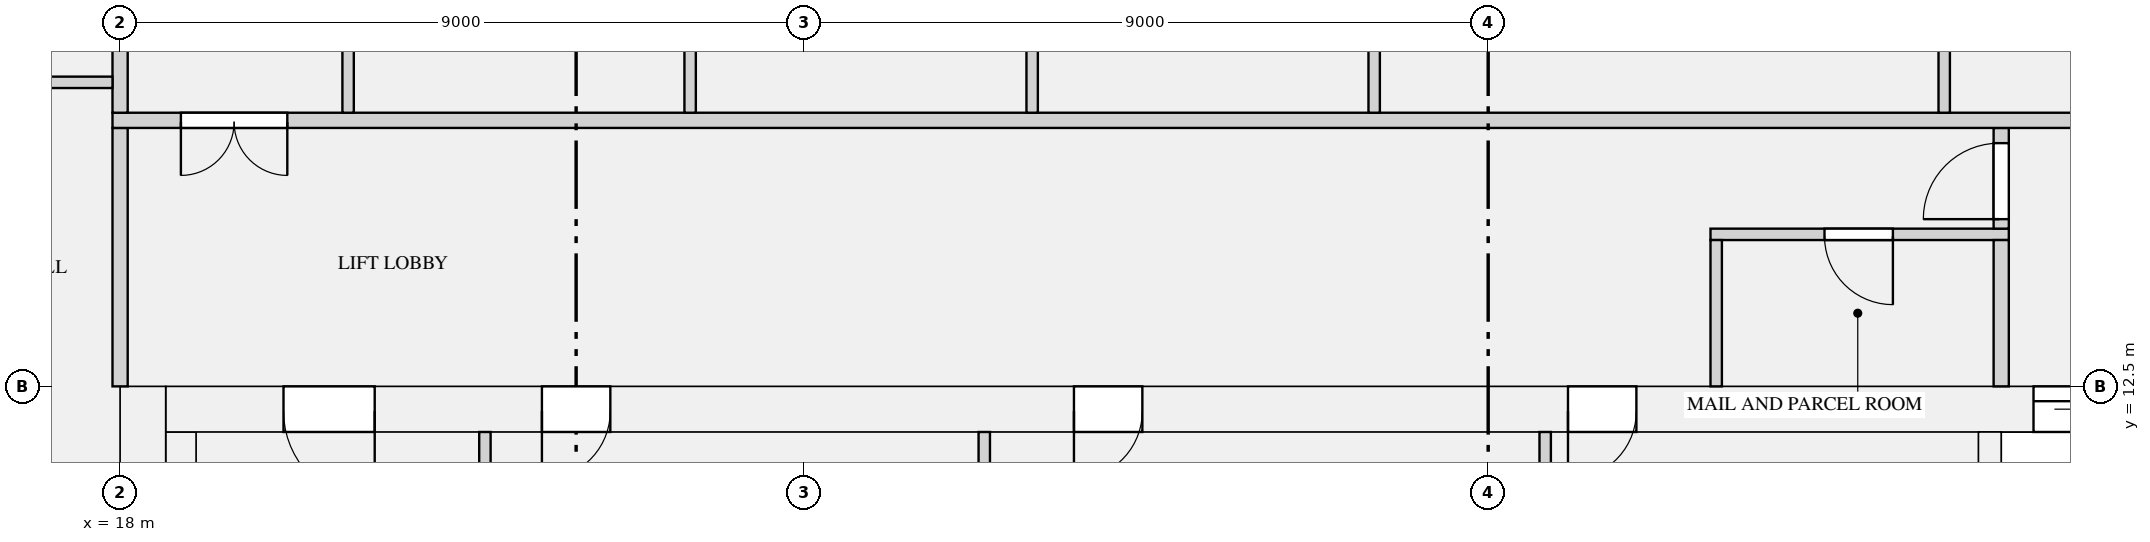
"""IFC4 building model, lengths in metres.
Left out: names, types, materials, properties, quantities, classifications, styles, units other than length and angle.
Written with IfcOpenShell. Run it as: python <this file> out.ifc"""

import sys

from ifc_helpers import new_model, si_unit, direction, frame, frame_2d, origin, place, context, subcontext, project, spatial, rectangle, extrude, element, fill, save


model = new_model("IFC4")
c1 = context("Model", 3, precision=1e-05, world=origin(), true_north=direction((0.0, 1.0)))
c2 = subcontext(c1, "Body", "Model", "MODEL_VIEW")
j1 = project(units=[si_unit("LENGTHUNIT", "METRE"), si_unit("PLANEANGLEUNIT", "RADIAN")], contexts=[c1])
p1 = place(None, origin())
s1 = spatial("IfcSite", under=j1, at=p1, CompositionType="ELEMENT")
p2 = place(p1, origin())
s2 = spatial("IfcBuilding", under=s1, at=p2, CompositionType="ELEMENT")
p3 = place(p2, frame((0.0, 0.0, 229.5)))
s3 = spatial("IfcBuildingStorey", under=s2, at=p3, CompositionType="ELEMENT", Elevation=229.5)
p4 = place(p3, frame((18.3, 0.0, 0.0), z_axis=(0.0, 0.0, 1.0), x_axis=(0.0, 1.0, 0.0)))
e1 = element("IfcWall", 1, at=p4, inside=s3, PredefinedType="SHEAR", context=c2, shape_type="SweptSolid", body=[
    extrude(rectangle(XDim=12.5, YDim=0.6, at=frame_2d((6.25, 0.0))), origin(), (0.0, 0.0, 1.0), 3.15),
])
p5 = place(p3, frame((18.6, 12.2, 0.0), z_axis=(0.0, 0.0, 1.0), x_axis=(1.0, 0.0, 0.0)))
e2 = element("IfcWall", 2, at=p5, inside=s3, PredefinedType="SHEAR", context=c2, shape_type="SweptSolid", body=[
    extrude(rectangle(XDim=34.8, YDim=0.6, at=frame_2d((17.4, 0.0))), origin(), (0.0, 0.0, 1.0), 3.15),
])
p6 = place(p5, frame((24.575, 0.0, 0.0)))
e3 = element("IfcOpeningElement", 3, at=p6, cuts=e2, PredefinedType="OPENING", context=c2, shape_type="SweptSolid", body=[
    extrude(rectangle(XDim=1.1, YDim=2.1, at=frame_2d((0.55, 1.05))), frame((0.0, 0.31, 0.0), z_axis=(0.0, -1.0, 0.0), x_axis=(1.0, 0.0, 0.0)), (0.0, 0.0, 1.0), 0.62),
])
p7 = place(p5, frame((26.825, 0.0, 0.0)))
e4 = element("IfcOpeningElement", 4, at=p7, cuts=e2, PredefinedType="OPENING", context=c2, shape_type="SweptSolid", body=[
    extrude(rectangle(XDim=1.1, YDim=2.1, at=frame_2d((0.55, 1.05))), frame((0.0, 0.31, 0.0), z_axis=(0.0, -1.0, 0.0), x_axis=(1.0, 0.0, 0.0)), (0.0, 0.0, 1.0), 0.62),
])
p8 = place(p5, frame((29.075, 0.0, 0.0)))
e5 = element("IfcOpeningElement", 5, at=p8, cuts=e2, PredefinedType="OPENING", context=c2, shape_type="SweptSolid", body=[
    extrude(rectangle(XDim=1.1, YDim=2.1, at=frame_2d((0.55, 1.05))), frame((0.0, 0.31, 0.0), z_axis=(0.0, -1.0, 0.0), x_axis=(1.0, 0.0, 0.0)), (0.0, 0.0, 1.0), 0.62),
])
p9 = place(p5, frame((4.95, 0.0, 0.0)))
e6 = element("IfcOpeningElement", 6, at=p9, cuts=e2, PredefinedType="OPENING", context=c2, shape_type="SweptSolid", body=[
    extrude(rectangle(XDim=0.9, YDim=2.1, at=frame_2d((0.45, 1.05))), frame((0.0, 0.31, 0.0), z_axis=(0.0, -1.0, 0.0), x_axis=(1.0, 0.0, 0.0)), (0.0, 0.0, 1.0), 0.62),
])
p10 = place(p5, frame((11.95, 0.0, 0.0)))
e7 = element("IfcOpeningElement", 7, at=p10, cuts=e2, PredefinedType="OPENING", context=c2, shape_type="SweptSolid", body=[
    extrude(rectangle(XDim=0.9, YDim=2.1, at=frame_2d((0.45, 1.05))), frame((0.0, 0.31, 0.0), z_axis=(0.0, -1.0, 0.0), x_axis=(1.0, 0.0, 0.0)), (0.0, 0.0, 1.0), 0.62),
])
p11 = place(p5, frame((18.45, 0.0, 0.0)))
e8 = element("IfcOpeningElement", 8, at=p11, cuts=e2, PredefinedType="OPENING", context=c2, shape_type="SweptSolid", body=[
    extrude(rectangle(XDim=0.9, YDim=2.1, at=frame_2d((0.45, 1.05))), frame((0.0, 0.31, 0.0), z_axis=(0.0, -1.0, 0.0), x_axis=(1.0, 0.0, 0.0)), (0.0, 0.0, 1.0), 0.62),
])
p12 = place(p5, frame((1.55, 0.0, 0.0)))
e9 = element("IfcOpeningElement", 9, at=p12, cuts=e2, PredefinedType="OPENING", context=c2, shape_type="SweptSolid", body=[
    extrude(rectangle(XDim=1.2, YDim=2.1, at=frame_2d((0.6, 1.05))), frame((0.0, 0.31, 0.0), z_axis=(0.0, -1.0, 0.0), x_axis=(1.0, 0.0, 0.0)), (0.0, 0.0, 1.0), 0.62),
])
p13 = place(p5, frame((32.05, 0.0, 0.0)))
e10 = element("IfcOpeningElement", 10, at=p13, cuts=e2, PredefinedType="OPENING", context=c2, shape_type="SweptSolid", body=[
    extrude(rectangle(XDim=1.2, YDim=2.1, at=frame_2d((0.6, 1.05))), frame((0.0, 0.31, 0.0), z_axis=(0.0, -1.0, 0.0), x_axis=(1.0, 0.0, 0.0)), (0.0, 0.0, 1.0), 0.62),
])
p14 = place(p3, frame((18.8, 1.0, 0.0), z_axis=(0.0, 0.0, 1.0), x_axis=(0.0, 1.0, 0.0)))
e11 = element("IfcWall", 11, at=p14, inside=s3, PredefinedType="SHEAR", context=c2, shape_type="SweptSolid", body=[
    extrude(rectangle(XDim=10.9, YDim=0.4, at=frame_2d((5.45, 0.0))), origin(), (0.0, 0.0, 1.0), 3.15),
])
p15 = place(p3, frame((42.6, 8.25, 0.0), z_axis=(0.0, 0.0, 1.0), x_axis=(0.0, 1.0, 0.0)))
e12 = element("IfcWall", 12, at=p15, inside=s3, PredefinedType="SHEAR", context=c2, shape_type="SweptSolid", body=[
    extrude(rectangle(XDim=3.65, YDim=0.3, at=frame_2d((1.825, 0.0))), origin(), (0.0, 0.0, 1.0), 3.15),
])
p16 = place(p3, frame((38.925, 14.5, 0.0), z_axis=(0.0, 0.0, 1.0), x_axis=(1.0, 0.0, 0.0)))
e13 = element("IfcWall", 13, at=p16, inside=s3, PredefinedType="PARTITIONING", context=c2, shape_type="SweptSolid", body=[
    extrude(rectangle(XDim=3.925, YDim=0.15, at=frame_2d((1.962, 0.0))), origin(), (0.0, 0.0, 1.0), 2.83),
])
p17 = place(p16, frame((1.5, 0.0, 0.0)))
e14 = element("IfcOpeningElement", 14, at=p17, cuts=e13, PredefinedType="OPENING", context=c2, shape_type="SweptSolid", body=[
    extrude(rectangle(XDim=0.9, YDim=2.1, at=frame_2d((0.45, 1.05))), frame((0.0, 0.085, 0.0), z_axis=(0.0, -1.0, 0.0), x_axis=(1.0, 0.0, 0.0)), (0.0, 0.0, 1.0), 0.17),
])
for number, where, z_axis, x_axis in (
    (15, (22.8, 9.505, 0.0), (0.0, 0.0, 1.0), (0.0, 1.0, 0.0)),
    (16, (29.37, 9.505, 0.0), (0.0, 0.0, 1.0), (0.0, 1.0, 0.0)),
    (17, (36.75, 9.505, 0.0), (0.0, 0.0, 1.0), (0.0, 1.0, 0.0)),
):
    element("IfcWall", number, at=place(p3, frame(where, z_axis=z_axis, x_axis=x_axis)), inside=s3, PredefinedType="PARTITIONING", context=c2, shape_type="SweptSolid", body=[
        extrude(rectangle(XDim=2.395, YDim=0.15, at=frame_2d((1.198, 0.0))), origin(), (0.0, 0.0, 1.0), 2.83),
    ])
p18 = place(p3, frame((18.0, 12.5, 0.0), z_axis=(0.0, 0.0, 1.0), x_axis=(0.0, 1.0, 0.0)))
e18 = element("IfcWall", 18, at=p18, inside=s3, PredefinedType="PARTITIONING", context=c2, shape_type="SweptSolid", body=[
    extrude(rectangle(XDim=3.4, YDim=0.2, at=frame_2d((1.7, 0.0))), origin(), (0.0, 0.0, 1.0), 2.83),
])
p19 = place(p3, frame((39.0, 12.5, 0.0), z_axis=(0.0, 0.0, 1.0), x_axis=(0.0, 1.0, 0.0)))
e19 = element("IfcWall", 19, at=p19, inside=s3, PredefinedType="PARTITIONING", context=c2, shape_type="SweptSolid", body=[
    extrude(rectangle(XDim=1.925, YDim=0.15, at=frame_2d((0.962, 0.0))), origin(), (0.0, 0.0, 1.0), 2.83),
])
p20 = place(p3, frame((42.75, 12.5, 0.0), z_axis=(0.0, 0.0, 1.0), x_axis=(0.0, 1.0, 0.0)))
e20 = element("IfcWall", 20, at=p20, inside=s3, PredefinedType="PARTITIONING", context=c2, shape_type="SweptSolid", body=[
    extrude(rectangle(XDim=1.925, YDim=0.2, at=frame_2d((0.962, 0.0))), origin(), (0.0, 0.0, 1.0), 2.83),
])
p21 = place(p3, frame((42.75, 14.575, 0.0), z_axis=(0.0, 0.0, 1.0), x_axis=(0.0, 1.0, 0.0)))
e21 = element("IfcWall", 21, at=p21, inside=s3, PredefinedType="PARTITIONING", context=c2, shape_type="SweptSolid", body=[
    extrude(rectangle(XDim=1.325, YDim=0.2, at=frame_2d((0.663, 0.0))), origin(), (0.0, 0.0, 1.0), 2.83),
])
p22 = place(p21, frame((0.125, 0.0, 0.0)))
e22 = element("IfcOpeningElement", 22, at=p22, cuts=e21, PredefinedType="OPENING", context=c2, shape_type="SweptSolid", body=[
    extrude(rectangle(XDim=1.0, YDim=2.1, at=frame_2d((0.5, 1.05))), frame((0.0, 0.11, 0.0), z_axis=(0.0, -1.0, 0.0), x_axis=(1.0, 0.0, 0.0)), (0.0, 0.0, 1.0), 0.22),
])
p23 = place(p3, frame((12.15, 16.5, 0.0), z_axis=(0.0, 0.0, 1.0), x_axis=(1.0, 0.0, 0.0)))
e23 = element("IfcWall", 23, at=p23, inside=s3, PredefinedType="PARTITIONING", context=c2, shape_type="SweptSolid", body=[
    extrude(rectangle(XDim=5.75, YDim=0.15, at=frame_2d((2.875, 0.0))), origin(), (0.0, 0.0, 1.0), 2.83),
])
p24 = place(p23, frame((0.4, 0.0, 0.0)))
e24 = element("IfcOpeningElement", 24, at=p24, cuts=e23, PredefinedType="OPENING", context=c2, shape_type="SweptSolid", body=[
    extrude(rectangle(XDim=0.9, YDim=2.1, at=frame_2d((0.45, 1.05))), frame((0.0, 0.085, 0.0), z_axis=(0.0, -1.0, 0.0), x_axis=(1.0, 0.0, 0.0)), (0.0, 0.0, 1.0), 0.17),
])
p25 = place(p23, frame((3.4, 0.0, 0.0)))
e25 = element("IfcOpeningElement", 25, at=p25, cuts=e23, PredefinedType="OPENING", context=c2, shape_type="SweptSolid", body=[
    extrude(rectangle(XDim=0.9, YDim=2.1, at=frame_2d((0.45, 1.05))), frame((0.0, 0.085, 0.0), z_axis=(0.0, -1.0, 0.0), x_axis=(1.0, 0.0, 0.0)), (0.0, 0.0, 1.0), 0.17),
])
p26 = place(p3, frame((17.9, 16.0, 0.0), z_axis=(0.0, 0.0, 1.0), x_axis=(1.0, 0.0, 0.0)))
e26 = element("IfcWall", 26, at=p26, inside=s3, PredefinedType="PARTITIONING", context=c2, shape_type="SweptSolid", body=[
    extrude(rectangle(XDim=36.2, YDim=0.2, at=frame_2d((18.1, 0.0))), origin(), (0.0, 0.0, 1.0), 2.83),
])
p27 = place(p26, frame((0.9, 0.0, 0.0)))
e27 = element("IfcOpeningElement", 27, at=p27, cuts=e26, PredefinedType="OPENING", context=c2, shape_type="SweptSolid", body=[
    extrude(rectangle(XDim=1.4, YDim=2.1, at=frame_2d((0.7, 1.05))), frame((0.0, 0.11, 0.0), z_axis=(0.0, -1.0, 0.0), x_axis=(1.0, 0.0, 0.0)), (0.0, 0.0, 1.0), 0.22),
])
p28 = place(p26, frame((33.9, 0.0, 0.0)))
e28 = element("IfcOpeningElement", 28, at=p28, cuts=e26, PredefinedType="OPENING", context=c2, shape_type="SweptSolid", body=[
    extrude(rectangle(XDim=1.4, YDim=2.1, at=frame_2d((0.7, 1.05))), frame((0.0, 0.11, 0.0), z_axis=(0.0, -1.0, 0.0), x_axis=(1.0, 0.0, 0.0)), (0.0, 0.0, 1.0), 0.22),
])
p29 = place(p3, frame((18.0, 16.1, 0.0), z_axis=(0.0, 0.0, 1.0), x_axis=(0.0, 1.0, 0.0)))
e29 = element("IfcWall", 29, at=p29, inside=s3, PredefinedType="PARTITIONING", context=c2, shape_type="SweptSolid", body=[
    extrude(rectangle(XDim=7.8, YDim=0.2, at=frame_2d((3.9, 0.0))), origin(), (0.0, 0.0, 1.0), 2.83),
])
p30 = place(p29, frame((5.35, 0.0, 0.0)))
e30 = element("IfcOpeningElement", 30, at=p30, cuts=e29, PredefinedType="OPENING", context=c2, shape_type="SweptSolid", body=[
    extrude(rectangle(XDim=1.1, YDim=2.1, at=frame_2d((0.55, 1.05))), frame((0.0, 0.11, 0.0), z_axis=(0.0, -1.0, 0.0), x_axis=(1.0, 0.0, 0.0)), (0.0, 0.0, 1.0), 0.22),
])
p31 = place(p3, frame((21.0, 16.1, 0.0), z_axis=(0.0, 0.0, 1.0), x_axis=(0.0, 1.0, 0.0)))
e31 = element("IfcWall", 31, at=p31, inside=s3, PredefinedType="PARTITIONING", context=c2, shape_type="SweptSolid", body=[
    extrude(rectangle(XDim=4.825, YDim=0.15, at=frame_2d((2.413, 0.0))), origin(), (0.0, 0.0, 1.0), 2.83),
])
p32 = place(p31, frame((1.95, 0.0, 0.0)))
e32 = element("IfcOpeningElement", 32, at=p32, cuts=e31, PredefinedType="OPENING", context=c2, shape_type="SweptSolid", body=[
    extrude(rectangle(XDim=0.9, YDim=2.1, at=frame_2d((0.45, 1.05))), frame((0.0, 0.085, 0.0), z_axis=(0.0, -1.0, 0.0), x_axis=(1.0, 0.0, 0.0)), (0.0, 0.0, 1.0), 0.17),
])
for number, where, z_axis, x_axis in (
    (33, (25.5, 16.1, 0.0), (0.0, 0.0, 1.0), (0.0, 1.0, 0.0)),
    (34, (30.0, 16.1, 0.0), (0.0, 0.0, 1.0), (0.0, 1.0, 0.0)),
    (35, (34.5, 16.1, 0.0), (0.0, 0.0, 1.0), (0.0, 1.0, 0.0)),
    (36, (42.0, 16.1, 0.0), (0.0, 0.0, 1.0), (0.0, 1.0, 0.0)),
):
    element("IfcWall", number, at=place(p3, frame(where, z_axis=z_axis, x_axis=x_axis)), inside=s3, PredefinedType="PARTITIONING", context=c2, shape_type="SweptSolid", body=[
        extrude(rectangle(XDim=4.825, YDim=0.15, at=frame_2d((2.413, 0.0))), origin(), (0.0, 0.0, 1.0), 2.83),
    ])
p33 = place(p6, origin())
e37 = element("IfcDoor", 37, at=p33, inside=s3, OperationType="DOUBLE_DOOR_SLIDING", PredefinedType="DOOR", context=c2, shape_type="SweptSolid", body=[
    extrude(rectangle(XDim=1.1, YDim=2.1, at=frame_2d((0.55, 1.05))), frame((0.0, 0.025, 0.0), z_axis=(0.0, -1.0, 0.0), x_axis=(1.0, 0.0, 0.0)), (0.0, 0.0, 1.0), 0.05),
])
fill(e3, e37)
p34 = place(p17, frame((0.9, 0.0, 0.0), z_axis=(0.0, 0.0, 1.0), x_axis=(-1.0, 0.0, 0.0)))
e38 = element("IfcDoor", 38, at=p34, inside=s3, OperationType="SINGLE_SWING_LEFT", PredefinedType="DOOR", context=c2, shape_type="SweptSolid", body=[
    extrude(rectangle(XDim=0.9, YDim=2.1, at=frame_2d((0.45, 1.05))), frame((0.0, 0.025, 0.0), z_axis=(0.0, -1.0, 0.0), x_axis=(1.0, 0.0, 0.0)), (0.0, 0.0, 1.0), 0.05),
])
fill(e14, e38)
p35 = place(p9, frame((0.9, 0.0, 0.0), z_axis=(0.0, 0.0, 1.0), x_axis=(-1.0, 0.0, 0.0)))
e39 = element("IfcDoor", 39, at=p35, inside=s3, OperationType="SINGLE_SWING_RIGHT", PredefinedType="DOOR", context=c2, shape_type="SweptSolid", body=[
    extrude(rectangle(XDim=0.9, YDim=2.1, at=frame_2d((0.45, 1.05))), frame((0.0, 0.025, 0.0), z_axis=(0.0, -1.0, 0.0), x_axis=(1.0, 0.0, 0.0)), (0.0, 0.0, 1.0), 0.05),
])
fill(e6, e39)
p36 = place(p10, frame((0.9, 0.0, 0.0), z_axis=(0.0, 0.0, 1.0), x_axis=(-1.0, 0.0, 0.0)))
e40 = element("IfcDoor", 40, at=p36, inside=s3, OperationType="SINGLE_SWING_RIGHT", PredefinedType="DOOR", context=c2, shape_type="SweptSolid", body=[
    extrude(rectangle(XDim=0.9, YDim=2.1, at=frame_2d((0.45, 1.05))), frame((0.0, 0.025, 0.0), z_axis=(0.0, -1.0, 0.0), x_axis=(1.0, 0.0, 0.0)), (0.0, 0.0, 1.0), 0.05),
])
fill(e7, e40)
p37 = place(p11, frame((0.9, 0.0, 0.0), z_axis=(0.0, 0.0, 1.0), x_axis=(-1.0, 0.0, 0.0)))
e41 = element("IfcDoor", 41, at=p37, inside=s3, OperationType="SINGLE_SWING_RIGHT", PredefinedType="DOOR", context=c2, shape_type="SweptSolid", body=[
    extrude(rectangle(XDim=0.9, YDim=2.1, at=frame_2d((0.45, 1.05))), frame((0.0, 0.025, 0.0), z_axis=(0.0, -1.0, 0.0), x_axis=(1.0, 0.0, 0.0)), (0.0, 0.0, 1.0), 0.05),
])
fill(e8, e41)
p38 = place(p12, frame((1.2, 0.0, 0.0), z_axis=(0.0, 0.0, 1.0), x_axis=(-1.0, 0.0, 0.0)))
e42 = element("IfcDoor", 42, at=p38, inside=s3, OperationType="SINGLE_SWING_LEFT", PredefinedType="DOOR", context=c2, shape_type="SweptSolid", body=[
    extrude(rectangle(XDim=1.2, YDim=2.1, at=frame_2d((0.6, 1.05))), frame((0.0, 0.025, 0.0), z_axis=(0.0, -1.0, 0.0), x_axis=(1.0, 0.0, 0.0)), (0.0, 0.0, 1.0), 0.05),
])
fill(e9, e42)
p39 = place(p22, origin())
e43 = element("IfcDoor", 43, at=p39, inside=s3, OperationType="SINGLE_SWING_LEFT", PredefinedType="DOOR", context=c2, shape_type="SweptSolid", body=[
    extrude(rectangle(XDim=1.0, YDim=2.1, at=frame_2d((0.5, 1.05))), frame((0.0, 0.025, 0.0), z_axis=(0.0, -1.0, 0.0), x_axis=(1.0, 0.0, 0.0)), (0.0, 0.0, 1.0), 0.05),
])
fill(e22, e43)
p40 = place(p27, frame((1.4, 0.0, 0.0), z_axis=(0.0, 0.0, 1.0), x_axis=(-1.0, 0.0, 0.0)))
e44 = element("IfcDoor", 44, at=p40, inside=s3, OperationType="DOUBLE_DOOR_SINGLE_SWING", PredefinedType="DOOR", context=c2, shape_type="SweptSolid", body=[
    extrude(rectangle(XDim=1.4, YDim=2.1, at=frame_2d((0.7, 1.05))), frame((0.0, 0.025, 0.0), z_axis=(0.0, -1.0, 0.0), x_axis=(1.0, 0.0, 0.0)), (0.0, 0.0, 1.0), 0.05),
])
fill(e27, e44)
save(model, sys.argv[1])
